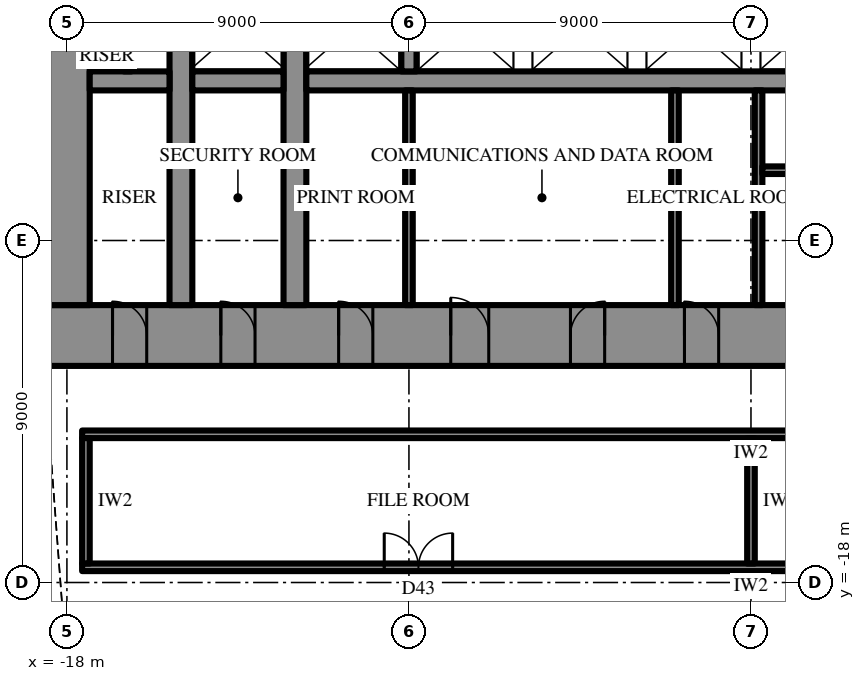
"""IFC4 building model, lengths in metres.
Left out: names, types, materials, properties, quantities, classifications, styles, units other than length and angle.
Written with IfcOpenShell. Run it as: python <this file> out.ifc"""

import sys

from ifc_helpers import new_model, si_unit, direction, frame, frame_2d, origin, place, context, subcontext, project, spatial, rectangle, extrude, element, fill, save


model = new_model("IFC4")
c1 = context("Model", 3, precision=1e-05, world=origin(), true_north=direction((0.0, 1.0)))
c2 = subcontext(c1, "Body", "Model", "MODEL_VIEW")
j1 = project(units=[si_unit("LENGTHUNIT", "METRE"), si_unit("PLANEANGLEUNIT", "RADIAN")], contexts=[c1])
p1 = place(None, origin())
s1 = spatial("IfcSite", under=j1, at=p1, CompositionType="ELEMENT")
p2 = place(p1, origin())
s2 = spatial("IfcBuilding", under=s1, at=p2, CompositionType="ELEMENT")
p3 = place(p2, frame((0.0, 0.0, 132.1)))
s3 = spatial("IfcBuildingStorey", under=s2, at=p3, CompositionType="ELEMENT", Elevation=132.1)
p4 = place(p3, frame((18.6, -11.5, 0.0), z_axis=(0.0, 0.0, 1.0), x_axis=(-1.0, 0.0, 0.0)))
e1 = element("IfcWall", 1, at=p4, inside=s3, PredefinedType="SHEAR", context=c2, shape_type="SweptSolid", body=[
    extrude(rectangle(XDim=37.2, YDim=1.6, at=frame_2d((18.6, 0.0))), origin(), (0.0, 0.0, 1.0), 4.2),
])
p5 = place(p4, frame((19.45, 0.0, 0.0)))
e2 = element("IfcOpeningElement", 2, at=p5, cuts=e1, PredefinedType="OPENING", context=c2, shape_type="SweptSolid", body=[
    extrude(rectangle(XDim=0.9, YDim=2.2, at=frame_2d((0.45, 1.1))), frame((0.0, 0.81, 0.0), z_axis=(0.0, -1.0, 0.0), x_axis=(1.0, 0.0, 0.0)), (0.0, 0.0, 1.0), 1.62),
])
p6 = place(p4, frame((22.45, 0.0, 0.0)))
e3 = element("IfcOpeningElement", 3, at=p6, cuts=e1, PredefinedType="OPENING", context=c2, shape_type="SweptSolid", body=[
    extrude(rectangle(XDim=0.9, YDim=2.2, at=frame_2d((0.45, 1.1))), frame((0.0, 0.81, 0.0), z_axis=(0.0, -1.0, 0.0), x_axis=(1.0, 0.0, 0.0)), (0.0, 0.0, 1.0), 1.62),
])
p7 = place(p4, frame((25.5, 0.0, 0.0)))
e4 = element("IfcOpeningElement", 4, at=p7, cuts=e1, PredefinedType="OPENING", context=c2, shape_type="SweptSolid", body=[
    extrude(rectangle(XDim=1.0, YDim=2.2, at=frame_2d((0.5, 1.1))), frame((0.0, 0.81, 0.0), z_axis=(0.0, -1.0, 0.0), x_axis=(1.0, 0.0, 0.0)), (0.0, 0.0, 1.0), 1.62),
])
p8 = place(p4, frame((1.8, 0.0, 0.0)))
e5 = element("IfcOpeningElement", 5, at=p8, cuts=e1, PredefinedType="OPENING", context=c2, shape_type="SweptSolid", body=[
    extrude(rectangle(XDim=0.9, YDim=2.2, at=frame_2d((0.45, 1.1))), frame((0.0, 0.81, 0.0), z_axis=(0.0, -1.0, 0.0), x_axis=(1.0, 0.0, 0.0)), (0.0, 0.0, 1.0), 1.62),
])
p9 = place(p4, frame((4.65, 0.0, 0.0)))
e6 = element("IfcOpeningElement", 6, at=p9, cuts=e1, PredefinedType="OPENING", context=c2, shape_type="SweptSolid", body=[
    extrude(rectangle(XDim=0.9, YDim=2.2, at=frame_2d((0.45, 1.1))), frame((0.0, 0.81, 0.0), z_axis=(0.0, -1.0, 0.0), x_axis=(1.0, 0.0, 0.0)), (0.0, 0.0, 1.0), 1.62),
])
p10 = place(p4, frame((7.75, 0.0, 0.0)))
e7 = element("IfcOpeningElement", 7, at=p10, cuts=e1, PredefinedType="OPENING", context=c2, shape_type="SweptSolid", body=[
    extrude(rectangle(XDim=0.9, YDim=2.2, at=frame_2d((0.45, 1.1))), frame((0.0, 0.81, 0.0), z_axis=(0.0, -1.0, 0.0), x_axis=(1.0, 0.0, 0.0)), (0.0, 0.0, 1.0), 1.62),
])
p11 = place(p4, frame((28.55, 0.0, 0.0)))
e8 = element("IfcOpeningElement", 8, at=p11, cuts=e1, PredefinedType="OPENING", context=c2, shape_type="SweptSolid", body=[
    extrude(rectangle(XDim=0.9, YDim=2.2, at=frame_2d((0.45, 1.1))), frame((0.0, 0.81, 0.0), z_axis=(0.0, -1.0, 0.0), x_axis=(1.0, 0.0, 0.0)), (0.0, 0.0, 1.0), 1.62),
])
p12 = place(p4, frame((31.65, 0.0, 0.0)))
e9 = element("IfcOpeningElement", 9, at=p12, cuts=e1, PredefinedType="OPENING", context=c2, shape_type="SweptSolid", body=[
    extrude(rectangle(XDim=0.9, YDim=2.2, at=frame_2d((0.45, 1.1))), frame((0.0, 0.81, 0.0), z_axis=(0.0, -1.0, 0.0), x_axis=(1.0, 0.0, 0.0)), (0.0, 0.0, 1.0), 1.62),
])
p13 = place(p4, frame((34.5, 0.0, 0.0)))
e10 = element("IfcOpeningElement", 10, at=p13, cuts=e1, PredefinedType="OPENING", context=c2, shape_type="SweptSolid", body=[
    extrude(rectangle(XDim=0.9, YDim=2.2, at=frame_2d((0.45, 1.1))), frame((0.0, 0.81, 0.0), z_axis=(0.0, -1.0, 0.0), x_axis=(1.0, 0.0, 0.0)), (0.0, 0.0, 1.0), 1.62),
])
p14 = place(p3, frame((-18.0, 10.7, 0.0), z_axis=(0.0, 0.0, 1.0), x_axis=(0.0, -1.0, 0.0)))
e11 = element("IfcWall", 11, at=p14, inside=s3, PredefinedType="SHEAR", context=c2, shape_type="SweptSolid", body=[
    extrude(rectangle(XDim=21.4, YDim=1.2, at=frame_2d((10.7, 0.0))), origin(), (0.0, 0.0, 1.0), 4.2),
])
p15 = place(p14, frame((9.8, 0.0, 0.0)))
e12 = element("IfcOpeningElement", 12, at=p15, cuts=e11, PredefinedType="OPENING", context=c2, shape_type="SweptSolid", body=[
    extrude(rectangle(XDim=1.8, YDim=2.4, at=frame_2d((0.9, 1.2))), frame((0.0, 0.61, 0.0), z_axis=(0.0, -1.0, 0.0), x_axis=(1.0, 0.0, 0.0)), (0.0, 0.0, 1.0), 1.22),
])
p16 = place(p3, frame((-12.0, -10.7, 0.0), z_axis=(0.0, 0.0, 1.0), x_axis=(0.0, 1.0, 0.0)))
e13 = element("IfcWall", 13, at=p16, inside=s3, PredefinedType="SHEAR", context=c2, shape_type="SweptSolid", body=[
    extrude(rectangle(XDim=21.4, YDim=0.6, at=frame_2d((10.7, 0.0))), origin(), (0.0, 0.0, 1.0), 4.2),
])
p17 = place(p16, frame((9.8, 0.0, 0.0)))
e14 = element("IfcOpeningElement", 14, at=p17, cuts=e13, PredefinedType="OPENING", context=c2, shape_type="SweptSolid", body=[
    extrude(rectangle(XDim=1.8, YDim=2.4, at=frame_2d((0.9, 1.2))), frame((0.0, 0.31, 0.0), z_axis=(0.0, -1.0, 0.0), x_axis=(1.0, 0.0, 0.0)), (0.0, 0.0, 1.0), 0.62),
])
p18 = place(p3, frame((-15.0, -10.7, 0.0), z_axis=(0.0, 0.0, 1.0), x_axis=(0.0, 1.0, 0.0)))
e15 = element("IfcWall", 15, at=p18, inside=s3, PredefinedType="SHEAR", context=c2, shape_type="SweptSolid", body=[
    extrude(rectangle(XDim=21.4, YDim=0.6, at=frame_2d((10.7, 0.0))), origin(), (0.0, 0.0, 1.0), 4.2),
])
p19 = place(p18, frame((9.8, 0.0, 0.0)))
e16 = element("IfcOpeningElement", 16, at=p19, cuts=e15, PredefinedType="OPENING", context=c2, shape_type="SweptSolid", body=[
    extrude(rectangle(XDim=1.8, YDim=2.4, at=frame_2d((0.9, 1.2))), frame((0.0, 0.31, 0.0), z_axis=(0.0, -1.0, 0.0), x_axis=(1.0, 0.0, 0.0)), (0.0, 0.0, 1.0), 0.62),
])
p20 = place(p3, frame((11.7, -4.8, 0.0), z_axis=(0.0, 0.0, 1.0), x_axis=(-1.0, 0.0, 0.0)))
e17 = element("IfcWall", 17, at=p20, inside=s3, PredefinedType="SHEAR", context=c2, shape_type="SweptSolid", body=[
    extrude(rectangle(XDim=23.4, YDim=0.5, at=frame_2d((11.7, 0.0))), origin(), (0.0, 0.0, 1.0), 4.2),
])
p21 = place(p20, frame((6.6, 0.0, 0.0)))
e18 = element("IfcOpeningElement", 18, at=p21, cuts=e17, PredefinedType="OPENING", context=c2, shape_type="SweptSolid", body=[
    extrude(rectangle(XDim=1.2, YDim=2.2, at=frame_2d((0.6, 1.1))), frame((0.0, 0.26, 0.0), z_axis=(0.0, -1.0, 0.0), x_axis=(1.0, 0.0, 0.0)), (0.0, 0.0, 1.0), 0.52),
])
p22 = place(p20, frame((3.6, 0.0, 0.0)))
e19 = element("IfcOpeningElement", 19, at=p22, cuts=e17, PredefinedType="OPENING", context=c2, shape_type="SweptSolid", body=[
    extrude(rectangle(XDim=1.2, YDim=2.2, at=frame_2d((0.6, 1.1))), frame((0.0, 0.26, 0.0), z_axis=(0.0, -1.0, 0.0), x_axis=(1.0, 0.0, 0.0)), (0.0, 0.0, 1.0), 0.52),
])
p23 = place(p3, frame((-12.3, -4.8, 0.0), z_axis=(0.0, 0.0, 1.0), x_axis=(-1.0, 0.0, 0.0)))
e20 = element("IfcWall", 20, at=p23, inside=s3, PredefinedType="SHEAR", context=c2, shape_type="SweptSolid", body=[
    extrude(rectangle(XDim=2.4, YDim=0.5, at=frame_2d((1.2, 0.0))), origin(), (0.0, 0.0, 1.0), 4.2),
])
p24 = place(p3, frame((-15.3, -4.8, 0.0), z_axis=(0.0, 0.0, 1.0), x_axis=(-1.0, 0.0, 0.0)))
e21 = element("IfcWall", 21, at=p24, inside=s3, PredefinedType="SHEAR", context=c2, shape_type="SweptSolid", body=[
    extrude(rectangle(XDim=2.1, YDim=0.5, at=frame_2d((1.05, 0.0))), origin(), (0.0, 0.0, 1.0), 4.2),
])
p25 = place(p3, frame((-9.0, -2.25, 0.0), z_axis=(0.0, 0.0, 1.0), x_axis=(0.0, -1.0, 0.0)))
e22 = element("IfcWall", 22, at=p25, inside=s3, PredefinedType="SHEAR", context=c2, shape_type="SweptSolid", body=[
    extrude(rectangle(XDim=2.3, YDim=0.4, at=frame_2d((1.15, 0.0))), origin(), (0.0, 0.0, 1.0), 4.2),
])
p26 = place(p3, frame((0.2, -5.05, 0.0), z_axis=(0.0, 0.0, 1.0), x_axis=(0.0, -1.0, 0.0)))
e23 = element("IfcWall", 23, at=p26, inside=s3, PredefinedType="SHEAR", context=c2, shape_type="SweptSolid", body=[
    extrude(rectangle(XDim=5.65, YDim=0.2, at=frame_2d((2.825, 0.0))), origin(), (0.0, 0.0, 1.0), 4.2),
])
p27 = place(p3, frame((8.9, -7.15, 0.0), z_axis=(0.0, 0.0, 1.0), x_axis=(-1.0, 0.0, 0.0)))
e24 = element("IfcWall", 24, at=p27, inside=s3, PredefinedType="SHEAR", context=c2, shape_type="SweptSolid", body=[
    extrude(rectangle(XDim=8.6, YDim=0.2, at=frame_2d((4.3, 0.0))), origin(), (0.0, 0.0, 1.0), 4.2),
])
p28 = place(p27, frame((0.3, 0.0, 0.0)))
e25 = element("IfcOpeningElement", 25, at=p28, cuts=e24, PredefinedType="OPENING", context=c2, shape_type="SweptSolid", body=[
    extrude(rectangle(XDim=1.0, YDim=2.2, at=frame_2d((0.5, 1.1))), frame((0.0, 0.11, 0.0), z_axis=(0.0, -1.0, 0.0), x_axis=(1.0, 0.0, 0.0)), (0.0, 0.0, 1.0), 0.22),
])
for number, where, z_axis, x_axis in (
    (26, (-9.0, -5.05, 0.0), (0.0, 0.0, 1.0), (0.0, -1.0, 0.0)),
    (27, (-2.0, -5.05, 0.0), (0.0, 0.0, 1.0), (0.0, -1.0, 0.0)),
):
    element("IfcWall", number, at=place(p3, frame(where, z_axis=z_axis, x_axis=x_axis)), inside=s3, PredefinedType="PARTITIONING", context=c2, shape_type="SweptSolid", body=[
        extrude(rectangle(XDim=5.65, YDim=0.2, at=frame_2d((2.825, 0.0))), origin(), (0.0, 0.0, 1.0), 4.0),
    ])
p29 = place(p3, frame((-16.4, -3.55, 0.0), z_axis=(0.0, 0.0, 1.0), x_axis=(0.0, -1.0, 0.0)))
e28 = element("IfcWall", 28, at=p29, inside=s3, PredefinedType="PARTITIONING", context=c2, shape_type="SweptSolid", body=[
    extrude(rectangle(XDim=1.0, YDim=0.2, at=frame_2d((0.5, 0.0))), origin(), (0.0, 0.0, 1.0), 4.0),
])
p30 = place(p3, frame((17.6, -14.1, 0.0), z_axis=(0.0, 0.0, 1.0), x_axis=(-1.0, 0.0, 0.0)))
e29 = element("IfcWall", 29, at=p30, inside=s3, PredefinedType="PARTITIONING", context=c2, shape_type="SweptSolid", body=[
    extrude(rectangle(XDim=35.2, YDim=0.2, at=frame_2d((17.6, 0.0))), origin(), (0.0, 0.0, 1.0), 4.0),
])
p31 = place(p3, frame((17.6, -17.6, 0.0), z_axis=(0.0, 0.0, 1.0), x_axis=(-1.0, 0.0, 0.0)))
e30 = element("IfcWall", 30, at=p31, inside=s3, PredefinedType="PARTITIONING", context=c2, shape_type="SweptSolid", body=[
    extrude(rectangle(XDim=35.2, YDim=0.2, at=frame_2d((17.6, 0.0))), origin(), (0.0, 0.0, 1.0), 4.0),
])
p32 = place(p31, frame((7.95, 0.0, 0.0)))
e31 = element("IfcOpeningElement", 31, at=p32, cuts=e30, PredefinedType="OPENING", context=c2, shape_type="SweptSolid", body=[
    extrude(rectangle(XDim=1.8, YDim=2.4, at=frame_2d((0.9, 1.2))), frame((0.0, 0.11, 0.0), z_axis=(0.0, -1.0, 0.0), x_axis=(1.0, 0.0, 0.0)), (0.0, 0.0, 1.0), 0.22),
])
p33 = place(p31, frame((25.45, 0.0, 0.0)))
e32 = element("IfcOpeningElement", 32, at=p33, cuts=e30, PredefinedType="OPENING", context=c2, shape_type="SweptSolid", body=[
    extrude(rectangle(XDim=1.8, YDim=2.4, at=frame_2d((0.9, 1.2))), frame((0.0, 0.11, 0.0), z_axis=(0.0, -1.0, 0.0), x_axis=(1.0, 0.0, 0.0)), (0.0, 0.0, 1.0), 0.22),
])
p34 = place(p3, frame((0.0, -14.2, 0.0), z_axis=(0.0, 0.0, 1.0), x_axis=(0.0, -1.0, 0.0)))
e33 = element("IfcWall", 33, at=p34, inside=s3, PredefinedType="PARTITIONING", context=c2, shape_type="SweptSolid", body=[
    extrude(rectangle(XDim=3.3, YDim=0.2, at=frame_2d((1.65, 0.0))), origin(), (0.0, 0.0, 1.0), 2.992),
])
p35 = place(p3, frame((-17.5, -14.2, 0.0), z_axis=(0.0, 0.0, 1.0), x_axis=(0.0, -1.0, 0.0)))
e34 = element("IfcWall", 34, at=p35, inside=s3, PredefinedType="PARTITIONING", context=c2, shape_type="SweptSolid", body=[
    extrude(rectangle(XDim=3.3, YDim=0.2, at=frame_2d((1.65, 0.0))), origin(), (0.0, 0.0, 1.0), 4.0),
])
p36 = place(p5, frame((0.9, 0.0, 0.0), z_axis=(0.0, 0.0, 1.0), x_axis=(-1.0, 0.0, 0.0)))
e35 = element("IfcDoor", 35, at=p36, inside=s3, OperationType="SINGLE_SWING_RIGHT", PredefinedType="DOOR", context=c2, shape_type="SweptSolid", body=[
    extrude(rectangle(XDim=0.9, YDim=2.2, at=frame_2d((0.45, 1.1))), frame((0.0, 0.025, 0.0), z_axis=(0.0, -1.0, 0.0), x_axis=(1.0, 0.0, 0.0)), (0.0, 0.0, 1.0), 0.05),
])
fill(e2, e35)
p37 = place(p6, frame((0.9, 0.0, 0.0), z_axis=(0.0, 0.0, 1.0), x_axis=(-1.0, 0.0, 0.0)))
e36 = element("IfcDoor", 36, at=p37, inside=s3, OperationType="SINGLE_SWING_LEFT", PredefinedType="DOOR", context=c2, shape_type="SweptSolid", body=[
    extrude(rectangle(XDim=0.9, YDim=2.2, at=frame_2d((0.45, 1.1))), frame((0.0, 0.025, 0.0), z_axis=(0.0, -1.0, 0.0), x_axis=(1.0, 0.0, 0.0)), (0.0, 0.0, 1.0), 0.05),
])
fill(e3, e36)
p38 = place(p7, frame((1.0, 0.0, 0.0), z_axis=(0.0, 0.0, 1.0), x_axis=(-1.0, 0.0, 0.0)))
e37 = element("IfcDoor", 37, at=p38, inside=s3, OperationType="SINGLE_SWING_RIGHT", PredefinedType="DOOR", context=c2, shape_type="SweptSolid", body=[
    extrude(rectangle(XDim=1.0, YDim=2.2, at=frame_2d((0.5, 1.1))), frame((0.0, 0.025, 0.0), z_axis=(0.0, -1.0, 0.0), x_axis=(1.0, 0.0, 0.0)), (0.0, 0.0, 1.0), 0.05),
])
fill(e4, e37)
p39 = place(p11, frame((0.9, 0.0, 0.0), z_axis=(0.0, 0.0, 1.0), x_axis=(-1.0, 0.0, 0.0)))
e38 = element("IfcDoor", 38, at=p39, inside=s3, OperationType="SINGLE_SWING_RIGHT", PredefinedType="DOOR", context=c2, shape_type="SweptSolid", body=[
    extrude(rectangle(XDim=0.9, YDim=2.2, at=frame_2d((0.45, 1.1))), frame((0.0, 0.025, 0.0), z_axis=(0.0, -1.0, 0.0), x_axis=(1.0, 0.0, 0.0)), (0.0, 0.0, 1.0), 0.05),
])
fill(e8, e38)
p40 = place(p12, frame((0.9, 0.0, 0.0), z_axis=(0.0, 0.0, 1.0), x_axis=(-1.0, 0.0, 0.0)))
e39 = element("IfcDoor", 39, at=p40, inside=s3, OperationType="SINGLE_SWING_RIGHT", PredefinedType="DOOR", context=c2, shape_type="SweptSolid", body=[
    extrude(rectangle(XDim=0.9, YDim=2.2, at=frame_2d((0.45, 1.1))), frame((0.0, 0.025, 0.0), z_axis=(0.0, -1.0, 0.0), x_axis=(1.0, 0.0, 0.0)), (0.0, 0.0, 1.0), 0.05),
])
fill(e9, e39)
p41 = place(p13, frame((0.9, 0.0, 0.0), z_axis=(0.0, 0.0, 1.0), x_axis=(-1.0, 0.0, 0.0)))
e40 = element("IfcDoor", 40, at=p41, inside=s3, OperationType="SINGLE_SWING_RIGHT", PredefinedType="DOOR", context=c2, shape_type="SweptSolid", body=[
    extrude(rectangle(XDim=0.9, YDim=2.2, at=frame_2d((0.45, 1.1))), frame((0.0, 0.025, 0.0), z_axis=(0.0, -1.0, 0.0), x_axis=(1.0, 0.0, 0.0)), (0.0, 0.0, 1.0), 0.05),
])
fill(e10, e40)
p42 = place(p33, frame((1.8, 0.0, 0.0), z_axis=(0.0, 0.0, 1.0), x_axis=(-1.0, 0.0, 0.0)))
e41 = element("IfcDoor", 41, at=p42, inside=s3, OperationType="DOUBLE_DOOR_SINGLE_SWING", PredefinedType="DOOR", context=c2, shape_type="SweptSolid", body=[
    extrude(rectangle(XDim=1.8, YDim=2.4, at=frame_2d((0.9, 1.2))), frame((0.0, 0.025, 0.0), z_axis=(0.0, -1.0, 0.0), x_axis=(1.0, 0.0, 0.0)), (0.0, 0.0, 1.0), 0.05),
])
fill(e32, e41)
save(model, sys.argv[1])
